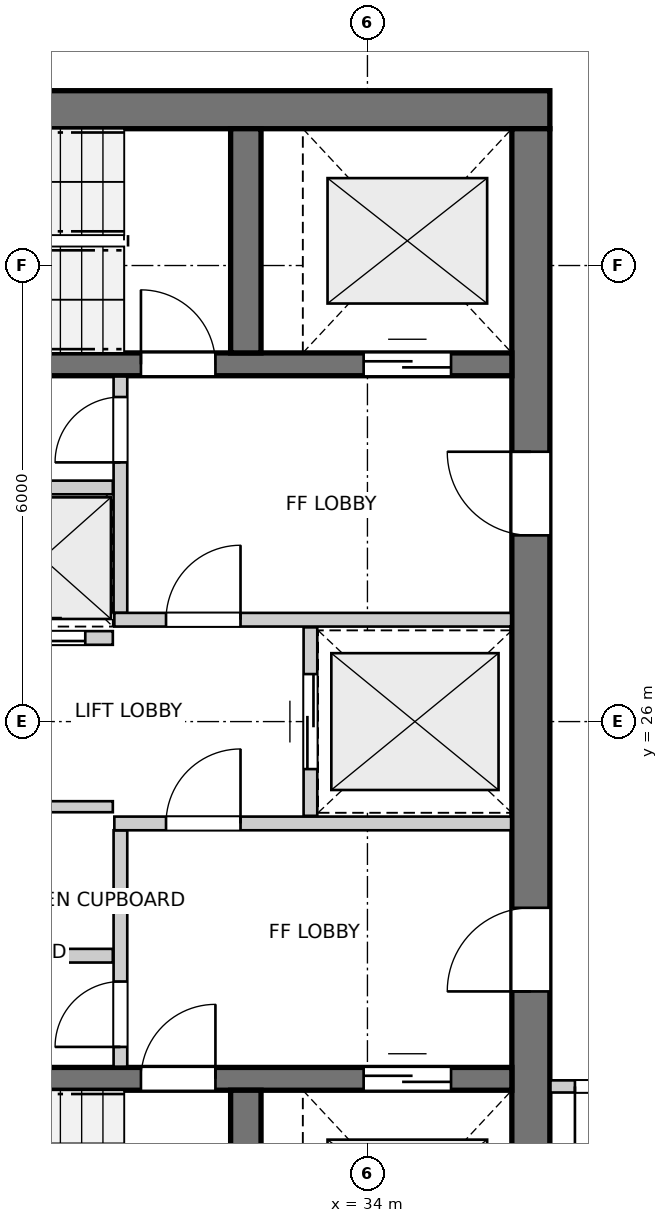
"""IFC4 building model, lengths in metres.
Left out: names, types, materials, properties, quantities, classifications, styles, units other than length and angle.
Written with IfcOpenShell. Run it as: python <this file> out.ifc"""

import sys

from ifc_helpers import new_model, si_unit, direction, frame, frame_2d, origin, place, context, subcontext, project, spatial, rectangle, extrude, source, transform, mapped, element, fill, save


model = new_model("IFC4")
c1 = context("Model", 3, precision=1e-05, world=origin(), true_north=direction((0.0, 1.0)))
c2 = subcontext(c1, "Body", "Model", "MODEL_VIEW")
j1 = project(units=[si_unit("LENGTHUNIT", "METRE"), si_unit("PLANEANGLEUNIT", "RADIAN")], contexts=[c1])
p1 = place(None, origin())
s1 = spatial("IfcSite", under=j1, at=p1, CompositionType="ELEMENT")
p2 = place(p1, origin())
s2 = spatial("IfcBuilding", under=s1, at=p2, CompositionType="ELEMENT")
p3 = place(p2, frame((0.0, 0.0, 230.8)))
s3 = spatial("IfcBuildingStorey", under=s2, at=p3, CompositionType="ELEMENT", Elevation=230.8)
p4 = place(p3, frame((36.4, 34.05, 0.0), z_axis=(0.0, 0.0, 1.0), x_axis=(-1.0, 0.0, 0.0)))
e1 = element("IfcWall", 1, at=p4, inside=s3, PredefinedType="SHEAR", context=c2, shape_type="SweptSolid", body=[
    extrude(rectangle(XDim=12.1, YDim=0.5, at=frame_2d((6.05, 0.0))), origin(), (0.0, 0.0, 1.0), 2.96),
])
p5 = place(p3, frame((36.15, 18.2, 0.0), z_axis=(0.0, 0.0, 1.0), x_axis=(0.0, 1.0, 0.0)))
e2 = element("IfcWall", 2, at=p5, inside=s3, PredefinedType="SHEAR", context=c2, shape_type="SweptSolid", body=[
    extrude(rectangle(XDim=15.6, YDim=0.5, at=frame_2d((7.8, 0.0))), origin(), (0.0, 0.0, 1.0), 2.96),
])
p6 = place(p5, frame((4.25, 0.0, 0.0)))
e3 = element("IfcOpeningElement", 3, at=p6, cuts=e2, PredefinedType="OPENING", context=c2, shape_type="SweptSolid", body=[
    extrude(rectangle(XDim=1.1, YDim=2.15, at=frame_2d((0.55, 1.075))), frame((0.0, 0.26, 0.0), z_axis=(0.0, -1.0, 0.0), x_axis=(1.0, 0.0, 0.0)), (0.0, 0.0, 1.0), 0.52),
])
p7 = place(p5, frame((10.25, 0.0, 0.0)))
e4 = element("IfcOpeningElement", 4, at=p7, cuts=e2, PredefinedType="OPENING", context=c2, shape_type="SweptSolid", body=[
    extrude(rectangle(XDim=1.1, YDim=2.15, at=frame_2d((0.55, 1.075))), frame((0.0, 0.26, 0.0), z_axis=(0.0, -1.0, 0.0), x_axis=(1.0, 0.0, 0.0)), (0.0, 0.0, 1.0), 0.52),
])
p8 = place(p3, frame((24.8, 21.3, 0.0), z_axis=(0.0, 0.0, 1.0), x_axis=(1.0, 0.0, 0.0)))
e5 = element("IfcWall", 5, at=p8, inside=s3, PredefinedType="SHEAR", context=c2, shape_type="SweptSolid", body=[
    extrude(rectangle(XDim=11.1, YDim=0.3, at=frame_2d((5.55, 0.0))), origin(), (0.0, 0.0, 1.0), 2.96),
])
p9 = place(p8, frame((6.22, 0.0, 0.0)))
e6 = element("IfcOpeningElement", 6, at=p9, cuts=e5, PredefinedType="OPENING", context=c2, shape_type="SweptSolid", body=[
    extrude(rectangle(XDim=0.98, YDim=2.15, at=frame_2d((0.49, 1.075))), frame((0.0, 0.16, 0.0), z_axis=(0.0, -1.0, 0.0), x_axis=(1.0, 0.0, 0.0)), (0.0, 0.0, 1.0), 0.32),
])
p10 = place(p8, frame((9.15, 0.0, 0.0)))
e7 = element("IfcOpeningElement", 7, at=p10, cuts=e5, PredefinedType="OPENING", context=c2, shape_type="SweptSolid", body=[
    extrude(rectangle(XDim=1.15, YDim=2.15, at=frame_2d((0.575, 1.075))), frame((0.0, 0.16, 0.0), z_axis=(0.0, -1.0, 0.0), x_axis=(1.0, 0.0, 0.0)), (0.0, 0.0, 1.0), 0.32),
])
p11 = place(p3, frame((32.4, 18.2, 0.0), z_axis=(0.0, 0.0, 1.0), x_axis=(0.0, 1.0, 0.0)))
e8 = element("IfcWall", 8, at=p11, inside=s3, PredefinedType="SHEAR", context=c2, shape_type="SweptSolid", body=[
    extrude(rectangle(XDim=2.95, YDim=0.4, at=frame_2d((1.475, 0.0))), origin(), (0.0, 0.0, 1.0), 2.96),
])
p12 = place(p3, frame((24.8, 30.7, 0.0), z_axis=(0.0, 0.0, 1.0), x_axis=(1.0, 0.0, 0.0)))
e9 = element("IfcWall", 9, at=p12, inside=s3, PredefinedType="SHEAR", context=c2, shape_type="SweptSolid", body=[
    extrude(rectangle(XDim=11.1, YDim=0.3, at=frame_2d((5.55, 0.0))), origin(), (0.0, 0.0, 1.0), 2.96),
])
p13 = place(p12, frame((6.22, 0.0, 0.0)))
e10 = element("IfcOpeningElement", 10, at=p13, cuts=e9, PredefinedType="OPENING", context=c2, shape_type="SweptSolid", body=[
    extrude(rectangle(XDim=0.98, YDim=2.15, at=frame_2d((0.49, 1.075))), frame((0.0, 0.16, 0.0), z_axis=(0.0, -1.0, 0.0), x_axis=(1.0, 0.0, 0.0)), (0.0, 0.0, 1.0), 0.32),
])
p14 = place(p12, frame((9.15, 0.0, 0.0)))
e11 = element("IfcOpeningElement", 11, at=p14, cuts=e9, PredefinedType="OPENING", context=c2, shape_type="SweptSolid", body=[
    extrude(rectangle(XDim=1.15, YDim=2.15, at=frame_2d((0.575, 1.075))), frame((0.0, 0.16, 0.0), z_axis=(0.0, -1.0, 0.0), x_axis=(1.0, 0.0, 0.0)), (0.0, 0.0, 1.0), 0.32),
])
p15 = place(p3, frame((32.4, 30.85, 0.0), z_axis=(0.0, 0.0, 1.0), x_axis=(0.0, 1.0, 0.0)))
e12 = element("IfcWall", 12, at=p15, inside=s3, PredefinedType="SHEAR", context=c2, shape_type="SweptSolid", body=[
    extrude(rectangle(XDim=2.95, YDim=0.4, at=frame_2d((1.475, 0.0))), origin(), (0.0, 0.0, 1.0), 2.96),
])
p16 = place(p3, frame((30.75, 21.46, 0.0), z_axis=(0.0, 0.0, 1.0), x_axis=(0.0, 1.0, 0.0)))
e13 = element("IfcWall", 13, at=p16, inside=s3, PredefinedType="PARTITIONING", context=c2, shape_type="SweptSolid", body=[
    extrude(rectangle(XDim=3.11, YDim=0.18, at=frame_2d((1.555, 0.0))), origin(), (0.0, 0.0, 1.0), 2.96),
])
p17 = place(p16, frame((0.26, 0.0, 0.0)))
e14 = element("IfcOpeningElement", 14, at=p17, cuts=e13, PredefinedType="OPENING", context=c2, shape_type="SweptSolid", body=[
    extrude(rectangle(XDim=0.86, YDim=2.05, at=frame_2d((0.43, 1.025))), frame((0.0, 0.1, 0.0), z_axis=(0.0, -1.0, 0.0), x_axis=(1.0, 0.0, 0.0)), (0.0, 0.0, 1.0), 0.2),
])
p18 = place(p3, frame((30.67, 24.66, 0.0), z_axis=(0.0, 0.0, 1.0), x_axis=(1.0, 0.0, 0.0)))
e15 = element("IfcWall", 15, at=p18, inside=s3, PredefinedType="PARTITIONING", context=c2, shape_type="SweptSolid", body=[
    extrude(rectangle(XDim=5.22, YDim=0.18, at=frame_2d((2.61, 0.0))), origin(), (0.0, 0.0, 1.0), 2.96),
])
p19 = place(p18, frame((0.68, 0.0, 0.0)))
e16 = element("IfcOpeningElement", 16, at=p19, cuts=e15, PredefinedType="OPENING", context=c2, shape_type="SweptSolid", body=[
    extrude(rectangle(XDim=0.98, YDim=2.15, at=frame_2d((0.49, 1.075))), frame((0.0, 0.1, 0.0), z_axis=(0.0, -1.0, 0.0), x_axis=(1.0, 0.0, 0.0)), (0.0, 0.0, 1.0), 0.2),
])
p20 = place(p3, frame((30.75, 27.43, 0.0), z_axis=(0.0, 0.0, 1.0), x_axis=(0.0, 1.0, 0.0)))
e17 = element("IfcWall", 17, at=p20, inside=s3, PredefinedType="PARTITIONING", context=c2, shape_type="SweptSolid", body=[
    extrude(rectangle(XDim=3.11, YDim=0.18, at=frame_2d((1.555, 0.0))), origin(), (0.0, 0.0, 1.0), 2.96),
])
p21 = place(p20, frame((1.98, 0.0, 0.0)))
e18 = element("IfcOpeningElement", 18, at=p21, cuts=e17, PredefinedType="OPENING", context=c2, shape_type="SweptSolid", body=[
    extrude(rectangle(XDim=0.86, YDim=2.05, at=frame_2d((0.43, 1.025))), frame((0.0, 0.1, 0.0), z_axis=(0.0, -1.0, 0.0), x_axis=(1.0, 0.0, 0.0)), (0.0, 0.0, 1.0), 0.2),
])
p22 = place(p3, frame((30.67, 27.34, 0.0), z_axis=(0.0, 0.0, 1.0), x_axis=(1.0, 0.0, 0.0)))
e19 = element("IfcWall", 19, at=p22, inside=s3, PredefinedType="PARTITIONING", context=c2, shape_type="SweptSolid", body=[
    extrude(rectangle(XDim=5.22, YDim=0.18, at=frame_2d((2.61, 0.0))), origin(), (0.0, 0.0, 1.0), 2.96),
])
p23 = place(p22, frame((0.68, 0.0, 0.0)))
e20 = element("IfcOpeningElement", 20, at=p23, cuts=e19, PredefinedType="OPENING", context=c2, shape_type="SweptSolid", body=[
    extrude(rectangle(XDim=0.98, YDim=2.15, at=frame_2d((0.49, 1.075))), frame((0.0, 0.1, 0.0), z_axis=(0.0, -1.0, 0.0), x_axis=(1.0, 0.0, 0.0)), (0.0, 0.0, 1.0), 0.2),
])
p24 = place(p3, frame((33.25, 24.76, 0.0), z_axis=(0.0, 0.0, 1.0), x_axis=(0.0, 1.0, 0.0)))
e21 = element("IfcWall", 21, at=p24, inside=s3, PredefinedType="PARTITIONING", context=c2, shape_type="SweptSolid", body=[
    extrude(rectangle(XDim=2.48, YDim=0.18, at=frame_2d((1.24, 0.0))), origin(), (0.0, 0.0, 1.0), 2.96),
])
p25 = place(p24, frame((0.615, 0.0, 0.0)))
e22 = element("IfcOpeningElement", 22, at=p25, cuts=e21, PredefinedType="OPENING", context=c2, shape_type="SweptSolid", body=[
    extrude(rectangle(XDim=1.25, YDim=2.15, at=frame_2d((0.625, 1.075))), frame((0.0, 0.1, 0.0), z_axis=(0.0, -1.0, 0.0), x_axis=(1.0, 0.0, 0.0)), (0.0, 0.0, 1.0), 0.2),
])
p26 = place(p3, frame((24.81, 22.92, 0.0), z_axis=(0.0, 0.0, 1.0), x_axis=(1.0, 0.0, 0.0)))
e23 = element("IfcWall", 23, at=p26, inside=s3, PredefinedType="PARTITIONING", context=c2, shape_type="SweptSolid", body=[
    extrude(rectangle(XDim=5.84, YDim=0.18, at=frame_2d((2.92, 0.0))), origin(), (0.0, 0.0, 1.0), 2.96),
])
p27 = place(p3, frame((28.13, 24.88, 0.0), z_axis=(0.0, 0.0, 1.0), x_axis=(1.0, 0.0, 0.0)))
e24 = element("IfcWall", 24, at=p27, inside=s3, PredefinedType="PARTITIONING", context=c2, shape_type="SweptSolid", body=[
    extrude(rectangle(XDim=2.52, YDim=0.145, at=frame_2d((1.26, 0.0))), origin(), (0.0, 0.0, 1.0), 2.96),
])
p28 = place(p27, frame((0.82, 0.0, 0.0)))
e25 = element("IfcOpeningElement", 25, at=p28, cuts=e24, PredefinedType="OPENING", context=c2, shape_type="SweptSolid", body=[
    extrude(rectangle(XDim=0.86, YDim=2.05, at=frame_2d((0.43, 1.025))), frame((0.0, 0.083, 0.0), z_axis=(0.0, -1.0, 0.0), x_axis=(1.0, 0.0, 0.0)), (0.0, 0.0, 1.0), 0.165),
])
p29 = place(p3, frame((24.81, 29.08, 0.0), z_axis=(0.0, 0.0, 1.0), x_axis=(1.0, 0.0, 0.0)))
e26 = element("IfcWall", 26, at=p29, inside=s3, PredefinedType="PARTITIONING", context=c2, shape_type="SweptSolid", body=[
    extrude(rectangle(XDim=5.84, YDim=0.18, at=frame_2d((2.92, 0.0))), origin(), (0.0, 0.0, 1.0), 2.96),
])
p30 = place(p3, frame((28.825, 27.1, 0.0), z_axis=(0.0, 0.0, 1.0), x_axis=(1.0, 0.0, 0.0)))
e27 = element("IfcWall", 27, at=p30, inside=s3, PredefinedType="PARTITIONING", context=c2, shape_type="SweptSolid", body=[
    extrude(rectangle(XDim=1.825, YDim=0.18, at=frame_2d((0.913, 0.0))), origin(), (0.0, 0.0, 1.0), 2.96),
])
p31 = place(p30, frame((0.363, 0.0, 0.0)))
e28 = element("IfcOpeningElement", 28, at=p31, cuts=e27, PredefinedType="OPENING", context=c2, shape_type="SweptSolid", body=[
    extrude(rectangle(XDim=1.1, YDim=2.15, at=frame_2d((0.55, 1.075))), frame((0.0, 0.1, 0.0), z_axis=(0.0, -1.0, 0.0), x_axis=(1.0, 0.0, 0.0)), (0.0, 0.0, 1.0), 0.2),
])
p32 = place(p3, frame((38.02, 21.2, 0.0), z_axis=(0.0, 0.0, 1.0), x_axis=(-1.0, 0.0, 0.0)))
e29 = element("IfcWall", 29, at=p32, inside=s3, PredefinedType="PARTITIONING", context=c2, shape_type="SweptSolid", body=[
    extrude(rectangle(XDim=1.612, YDim=0.16, at=frame_2d((0.806, 0.0))), origin(), (0.0, 0.0, 1.0), 2.96),
])
p33 = place(p32, frame((0.33, 0.0, 0.0)))
e30 = element("IfcOpeningElement", 30, at=p33, cuts=e29, PredefinedType="OPENING", context=c2, shape_type="SweptSolid", body=[
    extrude(rectangle(XDim=0.96, YDim=2.1, at=frame_2d((0.48, 1.05))), frame((0.0, 0.09, 0.0), z_axis=(0.0, -1.0, 0.0), x_axis=(1.0, 0.0, 0.0)), (0.0, 0.0, 1.0), 0.18),
])
m1 = source(origin(), c2, "Body", "SweptSolid", [
    extrude(rectangle(XDim=0.98, YDim=2.15, at=frame_2d((0.49, 1.075))), frame((0.0, 0.025, 0.0), z_axis=(0.0, -1.0, 0.0), x_axis=(1.0, 0.0, 0.0)), (0.0, 0.0, 1.0), 0.05),
])
p34 = place(p9, origin())
e31 = element("IfcDoor", 31, at=p34, inside=s3, OperationType="SINGLE_SWING_RIGHT", PredefinedType="DOOR", context=c2, shape_type="MappedRepresentation", body=[
    mapped(m1, transform((0.0, 0.0, 0.0), x_axis=(1.0, 0.0, 0.0), y_axis=(0.0, 1.0, 0.0), z_axis=(0.0, 0.0, 1.0), scale=1.0)),
])
fill(e6, e31)
m2 = source(origin(), c2, "Body", "SweptSolid", [
    extrude(rectangle(XDim=1.15, YDim=2.15, at=frame_2d((0.575, 1.075))), frame((0.0, 0.025, 0.0), z_axis=(0.0, -1.0, 0.0), x_axis=(1.0, 0.0, 0.0)), (0.0, 0.0, 1.0), 0.05),
])
p35 = place(p10, origin())
e32 = element("IfcDoor", 32, at=p35, inside=s3, OperationType="DOUBLE_DOOR_SLIDING", PredefinedType="DOOR", context=c2, shape_type="MappedRepresentation", body=[
    mapped(m2, transform((0.0, 0.0, 0.0), x_axis=(1.0, 0.0, 0.0), y_axis=(0.0, 1.0, 0.0), z_axis=(0.0, 0.0, 1.0), scale=1.0)),
])
fill(e7, e32)
p36 = place(p13, origin())
e33 = element("IfcDoor", 33, at=p36, inside=s3, OperationType="SINGLE_SWING_LEFT", PredefinedType="DOOR", context=c2, shape_type="MappedRepresentation", body=[
    mapped(m1, transform((0.0, 0.0, 0.0), x_axis=(1.0, 0.0, 0.0), y_axis=(0.0, 1.0, 0.0), z_axis=(0.0, 0.0, 1.0), scale=1.0)),
])
fill(e10, e33)
p37 = place(p14, origin())
e34 = element("IfcDoor", 34, at=p37, inside=s3, OperationType="DOUBLE_DOOR_SLIDING", PredefinedType="DOOR", context=c2, shape_type="MappedRepresentation", body=[
    mapped(m2, transform((0.0, 0.0, 0.0), x_axis=(1.0, 0.0, 0.0), y_axis=(0.0, 1.0, 0.0), z_axis=(0.0, 0.0, 1.0), scale=1.0)),
])
fill(e11, e34)
m3 = source(origin(), c2, "Body", "SweptSolid", [
    extrude(rectangle(XDim=1.1, YDim=2.15, at=frame_2d((0.55, 1.075))), frame((0.0, 0.025, 0.0), z_axis=(0.0, -1.0, 0.0), x_axis=(1.0, 0.0, 0.0)), (0.0, 0.0, 1.0), 0.05),
])
p38 = place(p6, origin())
e35 = element("IfcDoor", 35, at=p38, inside=s3, OperationType="SINGLE_SWING_LEFT", PredefinedType="DOOR", context=c2, shape_type="MappedRepresentation", body=[
    mapped(m3, transform((0.0, 0.0, 0.0), x_axis=(1.0, 0.0, 0.0), y_axis=(0.0, 1.0, 0.0), z_axis=(0.0, 0.0, 1.0), scale=1.0)),
])
fill(e3, e35)
p39 = place(p7, origin())
e36 = element("IfcDoor", 36, at=p39, inside=s3, OperationType="SINGLE_SWING_RIGHT", PredefinedType="DOOR", context=c2, shape_type="MappedRepresentation", body=[
    mapped(m3, transform((0.0, 0.0, 0.0), x_axis=(1.0, 0.0, 0.0), y_axis=(0.0, 1.0, 0.0), z_axis=(0.0, 0.0, 1.0), scale=1.0)),
])
fill(e4, e36)
m4 = source(origin(), c2, "Body", "SweptSolid", [
    extrude(rectangle(XDim=0.86, YDim=2.05, at=frame_2d((0.43, 1.025))), frame((0.0, 0.025, 0.0), z_axis=(0.0, -1.0, 0.0), x_axis=(1.0, 0.0, 0.0)), (0.0, 0.0, 1.0), 0.05),
])
p40 = place(p17, origin())
e37 = element("IfcDoor", 37, at=p40, inside=s3, OperationType="SINGLE_SWING_LEFT", PredefinedType="DOOR", context=c2, shape_type="MappedRepresentation", body=[
    mapped(m4, transform((0.0, 0.0, 0.0), x_axis=(1.0, 0.0, 0.0), y_axis=(0.0, 1.0, 0.0), z_axis=(0.0, 0.0, 1.0), scale=1.0)),
])
fill(e14, e37)
p41 = place(p19, origin())
e38 = element("IfcDoor", 38, at=p41, inside=s3, OperationType="SINGLE_SWING_RIGHT", PredefinedType="DOOR", context=c2, shape_type="MappedRepresentation", body=[
    mapped(m1, transform((0.0, 0.0, 0.0), x_axis=(1.0, 0.0, 0.0), y_axis=(0.0, 1.0, 0.0), z_axis=(0.0, 0.0, 1.0), scale=1.0)),
])
fill(e16, e38)
p42 = place(p21, origin())
e39 = element("IfcDoor", 39, at=p42, inside=s3, OperationType="SINGLE_SWING_LEFT", PredefinedType="DOOR", context=c2, shape_type="MappedRepresentation", body=[
    mapped(m4, transform((0.0, 0.0, 0.0), x_axis=(1.0, 0.0, 0.0), y_axis=(0.0, 1.0, 0.0), z_axis=(0.0, 0.0, 1.0), scale=1.0)),
])
fill(e18, e39)
p43 = place(p23, origin())
e40 = element("IfcDoor", 40, at=p43, inside=s3, OperationType="SINGLE_SWING_RIGHT", PredefinedType="DOOR", context=c2, shape_type="MappedRepresentation", body=[
    mapped(m1, transform((0.0, 0.0, 0.0), x_axis=(1.0, 0.0, 0.0), y_axis=(0.0, 1.0, 0.0), z_axis=(0.0, 0.0, 1.0), scale=1.0)),
])
fill(e20, e40)
m5 = source(origin(), c2, "Body", "SweptSolid", [
    extrude(rectangle(XDim=1.25, YDim=2.15, at=frame_2d((0.625, 1.075))), frame((0.0, 0.025, 0.0), z_axis=(0.0, -1.0, 0.0), x_axis=(1.0, 0.0, 0.0)), (0.0, 0.0, 1.0), 0.05),
])
p44 = place(p25, origin())
e41 = element("IfcDoor", 41, at=p44, inside=s3, OperationType="DOUBLE_DOOR_SLIDING", PredefinedType="DOOR", context=c2, shape_type="MappedRepresentation", body=[
    mapped(m5, transform((0.0, 0.0, 0.0), x_axis=(1.0, 0.0, 0.0), y_axis=(0.0, 1.0, 0.0), z_axis=(0.0, 0.0, 1.0), scale=1.0)),
])
fill(e22, e41)
p45 = place(p31, origin())
e42 = element("IfcDoor", 42, at=p45, inside=s3, OperationType="DOUBLE_DOOR_SLIDING", PredefinedType="DOOR", context=c2, shape_type="MappedRepresentation", body=[
    mapped(m3, transform((0.0, 0.0, 0.0), x_axis=(1.0, 0.0, 0.0), y_axis=(0.0, 1.0, 0.0), z_axis=(0.0, 0.0, 1.0), scale=1.0)),
])
fill(e28, e42)
m6 = source(origin(), c2, "Body", "SweptSolid", [
    extrude(rectangle(XDim=0.96, YDim=2.1, at=frame_2d((0.48, 1.05))), frame((0.0, 0.025, 0.0), z_axis=(0.0, -1.0, 0.0), x_axis=(1.0, 0.0, 0.0)), (0.0, 0.0, 1.0), 0.05),
])
p46 = place(p33, origin())
e43 = element("IfcDoor", 43, at=p46, inside=s3, OperationType="SINGLE_SWING_RIGHT", PredefinedType="DOOR", context=c2, shape_type="MappedRepresentation", body=[
    mapped(m6, transform((0.0, 0.0, 0.0), x_axis=(1.0, 0.0, 0.0), y_axis=(0.0, 1.0, 0.0), z_axis=(0.0, 0.0, 1.0), scale=1.0)),
])
fill(e30, e43)
save(model, sys.argv[1])
